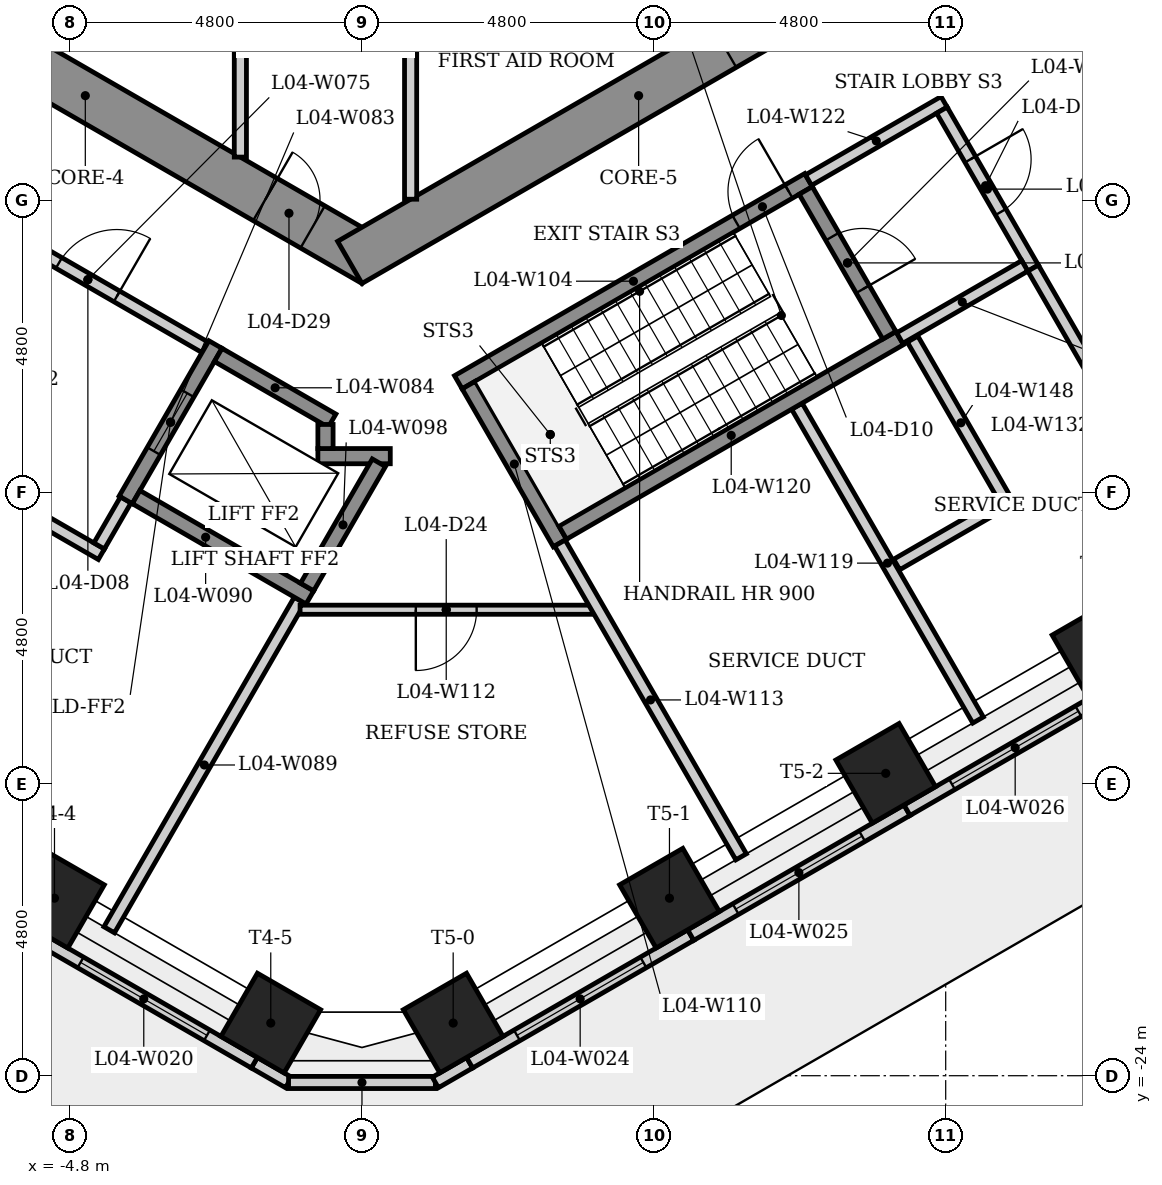
"""IFC4 building model, lengths in metres.
Left out: names, types, materials, properties, quantities, classifications, styles, units other than length and angle.
Written with IfcOpenShell. Run it as: python <this file> out.ifc"""

import sys

from ifc_helpers import new_model, si_unit, direction, frame, frame_2d, origin, origin_2d, place, context, subcontext, project, spatial, rectangle, extrude, element, fill, save


model = new_model("IFC4")
c1 = context("Model", 3, precision=1e-05, world=origin(), true_north=direction((0.0, 1.0)))
c2 = subcontext(c1, "Body", "Model", "MODEL_VIEW")
j1 = project(units=[si_unit("LENGTHUNIT", "METRE"), si_unit("PLANEANGLEUNIT", "RADIAN")], contexts=[c1])
p1 = place(None, origin())
s1 = spatial("IfcSite", under=j1, at=p1, CompositionType="ELEMENT")
p2 = place(p1, origin())
s2 = spatial("IfcBuilding", under=s1, at=p2, CompositionType="ELEMENT")
p3 = place(p2, frame((0.0, 0.0, 20.5)))
s3 = spatial("IfcBuildingStorey", under=s2, at=p3, CompositionType="ELEMENT", Elevation=20.5)
p4 = place(p3, frame((-9.3, -5.138, 0.0), z_axis=(0.0, 0.0, 1.0), x_axis=(0.866023993627, -0.500002442456, 0.0)))
e1 = element("IfcWall", 1, at=p4, inside=s3, PredefinedType="SHEAR", context=c2, shape_type="SweptSolid", body=[
    extrude(rectangle(XDim=10.97, YDim=0.8, at=frame_2d((5.485, 0.0))), origin(), (0.0, 0.0, 1.0), 5.0),
])
p5 = place(p4, frame((2.268, 0.0, 0.0)))
e2 = element("IfcOpeningElement", 2, at=p5, cuts=e1, PredefinedType="OPENING", context=c2, shape_type="SweptSolid", body=[
    extrude(rectangle(XDim=0.9, YDim=2.1, at=frame_2d((0.45, 1.05))), frame((0.0, 0.41, 0.0), z_axis=(0.0, -1.0, 0.0), x_axis=(1.0, 0.0, 0.0)), (0.0, 0.0, 1.0), 0.82),
])
p6 = place(p4, frame((8.903, 0.0, 0.0)))
e3 = element("IfcOpeningElement", 3, at=p6, cuts=e1, PredefinedType="OPENING", context=c2, shape_type="SweptSolid", body=[
    extrude(rectangle(XDim=0.9, YDim=2.1, at=frame_2d((0.45, 1.05))), frame((0.0, 0.41, 0.0), z_axis=(0.0, -1.0, 0.0), x_axis=(1.0, 0.0, 0.0)), (0.0, 0.0, 1.0), 0.82),
])
p7 = place(p3, frame((-0.2, -10.623, 0.0), z_axis=(0.0, 0.0, 1.0), x_axis=(0.866023993627, 0.500002442456, 0.0)))
e4 = element("IfcWall", 4, at=p7, inside=s3, PredefinedType="SHEAR", context=c2, shape_type="SweptSolid", body=[
    extrude(rectangle(XDim=10.97, YDim=0.8, at=frame_2d((5.485, 0.0))), origin(), (0.0, 0.0, 1.0), 5.0),
])
p8 = place(p7, frame((7.108, 0.0, 0.0)))
e5 = element("IfcOpeningElement", 5, at=p8, cuts=e4, PredefinedType="OPENING", context=c2, shape_type="SweptSolid", body=[
    extrude(rectangle(XDim=0.9, YDim=2.1, at=frame_2d((0.45, 1.05))), frame((0.0, 0.41, 0.0), z_axis=(0.0, -1.0, 0.0), x_axis=(1.0, 0.0, 0.0)), (0.0, 0.0, 1.0), 0.82),
])
for number, where, z_axis, x_axis in (
    (6, (-5.057, -21.08, 0.0), (0.0, 0.0, 1.0), (-0.5, -0.866, 0.0)),
    (7, (-1.5, -23.134, 0.0), (0.0, 0.0, 1.0), (-0.5, -0.866, 0.0)),
    (8, (1.5, -23.134, 0.0), (0.0, 0.0, 1.0), (0.5, -0.866, 0.0)),
    (9, (5.057, -21.08, 0.0), (0.0, 0.0, 1.0), (0.5, -0.866, 0.0)),
    (10, (8.614, -19.027, 0.0), (0.0, 0.0, 1.0), (0.5, -0.866, 0.0)),
    (11, (12.171, -16.973, 0.0), (0.0, 0.0, 1.0), (0.5, -0.866, 0.0)),
):
    element("IfcColumn", number, at=place(p3, frame(where, z_axis=z_axis, x_axis=x_axis)), inside=s3, PredefinedType="COLUMN", context=c2, shape_type="SweptSolid", body=[
        extrude(rectangle(XDim=1.2, YDim=1.2, at=origin_2d()), origin(), (0.0, 0.0, 1.0), 5.0),
    ])
p9 = place(p3, frame((-5.407, -21.687, 0.0), z_axis=(0.0, 0.0, 1.0), x_axis=(0.866016145416, -0.500016035621, 0.0)))
e12 = element("IfcWall", 12, at=p9, inside=s3, PredefinedType="SOLIDWALL", context=c2, shape_type="SweptSolid", body=[
    extrude(rectangle(XDim=4.199, YDim=0.2, at=frame_2d((2.1, 0.0))), origin(), (0.0, 0.0, 1.0), 4.88),
])
p10 = place(p9, frame((0.9, 0.0, 0.8)))
e13 = element("IfcOpeningElement", 13, at=p10, cuts=e12, PredefinedType="OPENING", context=c2, shape_type="SweptSolid", body=[
    extrude(rectangle(XDim=2.4, YDim=2.4, at=frame_2d((1.2, 1.2))), frame((0.0, 0.11, 0.0), z_axis=(0.0, -1.0, 0.0), x_axis=(1.0, 0.0, 0.0)), (0.0, 0.0, 1.0), 0.22),
])
p11 = place(p3, frame((-1.77, -23.786, 0.0), z_axis=(0.0, 0.0, 1.0), x_axis=(0.866085525409, -0.49989585183, 0.0)))
e14 = element("IfcWall", 14, at=p11, inside=s3, PredefinedType="SOLIDWALL", context=c2, shape_type="SweptSolid", body=[
    extrude(rectangle(XDim=0.65, YDim=0.2, at=frame_2d((0.325, 0.0))), origin(), (0.0, 0.0, 1.0), 4.88),
])
p12 = place(p3, frame((-1.207, -24.111, 0.0), z_axis=(0.0, 0.0, 1.0), x_axis=(1.0, 0.0, 0.0)))
e15 = element("IfcWall", 15, at=p12, inside=s3, PredefinedType="SOLIDWALL", context=c2, shape_type="SweptSolid", body=[
    extrude(rectangle(XDim=2.415, YDim=0.2, at=frame_2d((1.207, 0.0))), origin(), (0.0, 0.0, 1.0), 4.88),
])
p13 = place(p3, frame((1.207, -24.111, 0.0), z_axis=(0.0, 0.0, 1.0), x_axis=(0.866085525409, 0.49989585183, 0.0)))
e16 = element("IfcWall", 16, at=p13, inside=s3, PredefinedType="SOLIDWALL", context=c2, shape_type="SweptSolid", body=[
    extrude(rectangle(XDim=0.65, YDim=0.2, at=frame_2d((0.325, 0.0))), origin(), (0.0, 0.0, 1.0), 4.88),
])
p14 = place(p3, frame((1.77, -23.786, 0.0), z_axis=(0.0, 0.0, 1.0), x_axis=(0.866016145416, 0.500016035621, 0.0)))
e17 = element("IfcWall", 17, at=p14, inside=s3, PredefinedType="SOLIDWALL", context=c2, shape_type="SweptSolid", body=[
    extrude(rectangle(XDim=4.199, YDim=0.2, at=frame_2d((2.1, 0.0))), origin(), (0.0, 0.0, 1.0), 4.88),
])
p15 = place(p14, frame((0.899, 0.0, 0.8)))
e18 = element("IfcOpeningElement", 18, at=p15, cuts=e17, PredefinedType="OPENING", context=c2, shape_type="SweptSolid", body=[
    extrude(rectangle(XDim=2.4, YDim=2.4, at=frame_2d((1.2, 1.2))), frame((0.0, 0.11, 0.0), z_axis=(0.0, -1.0, 0.0), x_axis=(1.0, 0.0, 0.0)), (0.0, 0.0, 1.0), 0.22),
])
p16 = place(p3, frame((5.407, -21.687, 0.0), z_axis=(0.0, 0.0, 1.0), x_axis=(0.866029215606, 0.499993397673, 0.0)))
e19 = element("IfcWall", 19, at=p16, inside=s3, PredefinedType="SOLIDWALL", context=c2, shape_type="SweptSolid", body=[
    extrude(rectangle(XDim=4.108, YDim=0.2, at=frame_2d((2.054, 0.0))), origin(), (0.0, 0.0, 1.0), 4.88),
])
p17 = place(p16, frame((0.854, 0.0, 0.8)))
e20 = element("IfcOpeningElement", 20, at=p17, cuts=e19, PredefinedType="OPENING", context=c2, shape_type="SweptSolid", body=[
    extrude(rectangle(XDim=2.4, YDim=2.4, at=frame_2d((1.2, 1.2))), frame((0.0, 0.11, 0.0), z_axis=(0.0, -1.0, 0.0), x_axis=(1.0, 0.0, 0.0)), (0.0, 0.0, 1.0), 0.22),
])
p18 = place(p3, frame((8.964, -19.633, 0.0), z_axis=(0.0, 0.0, 1.0), x_axis=(0.866021252249, 0.500007190601, 0.0)))
e21 = element("IfcWall", 21, at=p18, inside=s3, PredefinedType="SOLIDWALL", context=c2, shape_type="SweptSolid", body=[
    extrude(rectangle(XDim=4.107, YDim=0.2, at=frame_2d((2.053, 0.0))), origin(), (0.0, 0.0, 1.0), 4.88),
])
p19 = place(p18, frame((0.854, 0.0, 0.8)))
e22 = element("IfcOpeningElement", 22, at=p19, cuts=e21, PredefinedType="OPENING", context=c2, shape_type="SweptSolid", body=[
    extrude(rectangle(XDim=2.4, YDim=2.4, at=frame_2d((1.2, 1.2))), frame((0.0, 0.11, 0.0), z_axis=(0.0, -1.0, 0.0), x_axis=(1.0, 0.0, 0.0)), (0.0, 0.0, 1.0), 0.22),
])
p20 = place(p3, frame((-8.356, -13.073, 0.0), z_axis=(0.0, 0.0, 1.0), x_axis=(0.866038532462, -0.499977259774, 0.0)))
e23 = element("IfcWall", 23, at=p20, inside=s3, PredefinedType="PLUMBINGWALL", context=c2, shape_type="SweptSolid", body=[
    extrude(rectangle(XDim=4.7, YDim=0.2, at=frame_2d((2.35, 0.0))), origin(), (0.0, 0.0, 1.0), 4.65),
])
p21 = place(p3, frame((-6.435, -9.795, 0.0), z_axis=(0.0, 0.0, 1.0), x_axis=(0.866012907634, -0.500021643343, 0.0)))
e24 = element("IfcWall", 24, at=p21, inside=s3, PredefinedType="PARTITIONING", context=c2, shape_type="SweptSolid", body=[
    extrude(rectangle(XDim=4.45, YDim=0.2, at=frame_2d((2.225, 0.0))), origin(), (0.0, 0.0, 1.0), 4.65),
])
p22 = place(p21, frame((1.675, 0.0, 0.0)))
e25 = element("IfcOpeningElement", 25, at=p22, cuts=e24, PredefinedType="OPENING", context=c2, shape_type="SweptSolid", body=[
    extrude(rectangle(XDim=1.1, YDim=2.1, at=frame_2d((0.55, 1.05))), frame((0.0, 0.11, 0.0), z_axis=(0.0, -1.0, 0.0), x_axis=(1.0, 0.0, 0.0)), (0.0, 0.0, 1.0), 0.22),
])
p23 = place(p3, frame((-3.885, -14.529, 0.0), z_axis=(0.0, 0.0, 1.0), x_axis=(-0.499859285417, -0.866106630146, 0.0)))
e26 = element("IfcWall", 26, at=p23, inside=s3, PredefinedType="PLUMBINGWALL", context=c2, shape_type="SweptSolid", body=[
    extrude(rectangle(XDim=0.875, YDim=0.2, at=frame_2d((0.438, 0.0))), origin(), (0.0, 0.0, 1.0), 4.65),
])
p24 = place(p3, frame((-2.41, -11.974, 0.0), z_axis=(0.0, 0.0, 1.0), x_axis=(-0.500001826776, -0.866024349092, 0.0)))
e27 = element("IfcWall", 27, at=p24, inside=s3, PredefinedType="SHEAR", context=c2, shape_type="SweptSolid", body=[
    extrude(rectangle(XDim=2.95, YDim=0.25, at=frame_2d((1.475, 0.0))), origin(), (0.0, 0.0, 1.0), 4.65),
])
p25 = place(p24, frame((0.925, 0.0, 0.0)))
e28 = element("IfcOpeningElement", 28, at=p25, cuts=e27, PredefinedType="OPENING", context=c2, shape_type="SweptSolid", body=[
    extrude(rectangle(XDim=1.1, YDim=2.1, at=frame_2d((0.55, 1.05))), frame((0.0, 0.135, 0.0), z_axis=(0.0, -1.0, 0.0), x_axis=(1.0, 0.0, 0.0)), (0.0, 0.0, 1.0), 0.27),
])
p26 = place(p3, frame((-2.364, -12.145, 0.0), z_axis=(0.0, 0.0, 1.0), x_axis=(0.86603892542, -0.499976579108, 0.0)))
e29 = element("IfcWall", 29, at=p26, inside=s3, PredefinedType="SHEAR", context=c2, shape_type="SweptSolid", body=[
    extrude(rectangle(XDim=2.162, YDim=0.25, at=frame_2d((1.081, 0.0))), origin(), (0.0, 0.0, 1.0), 4.65),
])
p27 = place(p3, frame((-2.0, -5.275, 0.0), z_axis=(0.0, 0.0, 1.0), x_axis=(0.0, -1.0, 0.0)))
e30 = element("IfcWall", 30, at=p27, inside=s3, PredefinedType="PARTITIONING", context=c2, shape_type="SweptSolid", body=[
    extrude(rectangle(XDim=3.616, YDim=0.2, at=frame_2d((1.808, 0.0))), origin(), (0.0, 0.0, 1.0), 4.65),
])
p28 = place(p3, frame((-4.157, -21.6, 0.0), z_axis=(0.0, 0.0, 1.0), x_axis=(0.499998165157, 0.866026463129, 0.0)))
e31 = element("IfcWall", 31, at=p28, inside=s3, PredefinedType="PLUMBINGWALL", context=c2, shape_type="SweptSolid", body=[
    extrude(rectangle(XDim=6.26, YDim=0.2, at=frame_2d((3.13, 0.0))), origin(), (0.0, 0.0, 1.0), 4.65),
])
p29 = place(p3, frame((-0.856, -16.133, 0.0), z_axis=(0.0, 0.0, 1.0), x_axis=(-0.866021716278, 0.500006386895, 0.0)))
e32 = element("IfcWall", 32, at=p29, inside=s3, PredefinedType="SHEAR", context=c2, shape_type="SweptSolid", body=[
    extrude(rectangle(XDim=3.3, YDim=0.25, at=frame_2d((1.65, 0.0))), origin(), (0.0, 0.0, 1.0), 4.65),
])
p30 = place(p3, frame((-0.725, -13.81, 0.0), z_axis=(0.0, 0.0, 1.0), x_axis=(1.0, 0.0, 0.0)))
e33 = element("IfcWall", 33, at=p30, inside=s3, PredefinedType="SHEAR", context=c2, shape_type="SweptSolid", body=[
    extrude(rectangle(XDim=1.191, YDim=0.25, at=frame_2d((0.595, 0.0))), origin(), (0.0, 0.0, 1.0), 4.65),
])
p31 = place(p3, frame((-0.6, -13.289, 0.0), z_axis=(0.0, 0.0, 1.0), x_axis=(0.0, -1.0, 0.0)))
e34 = element("IfcWall", 34, at=p31, inside=s3, PredefinedType="SHEAR", context=c2, shape_type="SweptSolid", body=[
    extrude(rectangle(XDim=0.396, YDim=0.25, at=frame_2d((0.198, 0.0))), origin(), (0.0, 0.0, 1.0), 5.0),
])
p32 = place(p3, frame((0.278, -13.918, 0.0), z_axis=(0.0, 0.0, 1.0), x_axis=(-0.49998806882, -0.866032292145, 0.0)))
e35 = element("IfcWall", 35, at=p32, inside=s3, PredefinedType="SHEAR", context=c2, shape_type="SweptSolid", body=[
    extrude(rectangle(XDim=2.36, YDim=0.25, at=frame_2d((1.18, 0.0))), origin(), (0.0, 0.0, 1.0), 5.0),
])
p33 = place(p3, frame((0.8, -5.275, 0.0), z_axis=(0.0, 0.0, 1.0), x_axis=(0.0, -1.0, 0.0)))
e36 = element("IfcWall", 36, at=p33, inside=s3, PredefinedType="PARTITIONING", context=c2, shape_type="SweptSolid", body=[
    extrude(rectangle(XDim=4.309, YDim=0.2, at=frame_2d((2.155, 0.0))), origin(), (0.0, 0.0, 1.0), 4.65),
])
p34 = place(p3, frame((1.585, -12.595, 0.0), z_axis=(0.0, 0.0, 1.0), x_axis=(0.866036417653, 0.499980922934, 0.0)))
e37 = element("IfcWall", 37, at=p34, inside=s3, PredefinedType="SHEAR", context=c2, shape_type="SweptSolid", body=[
    extrude(rectangle(XDim=6.65, YDim=0.25, at=frame_2d((3.325, 0.0))), origin(), (0.0, 0.0, 1.0), 4.65),
])
p35 = place(p34, frame((5.275, 0.0, 0.0)))
e38 = element("IfcOpeningElement", 38, at=p35, cuts=e37, PredefinedType="OPENING", context=c2, shape_type="SweptSolid", body=[
    extrude(rectangle(XDim=1.0, YDim=2.1, at=frame_2d((0.5, 1.05))), frame((0.0, 0.135, 0.0), z_axis=(0.0, -1.0, 0.0), x_axis=(1.0, 0.0, 0.0)), (0.0, 0.0, 1.0), 0.27),
])
p36 = place(p3, frame((3.256, -15.239, 0.0), z_axis=(0.0, 0.0, 1.0), x_axis=(-0.50002537861, 0.866010750942, 0.0)))
e39 = element("IfcWall", 39, at=p36, inside=s3, PredefinedType="SHEAR", context=c2, shape_type="SweptSolid", body=[
    extrude(rectangle(XDim=3.0, YDim=0.25, at=frame_2d((1.5, 0.0))), origin(), (0.0, 0.0, 1.0), 4.65),
])
p37 = place(p3, frame((3.789, -16.336, 0.0), z_axis=(0.0, 0.0, 1.0), x_axis=(-1.0, 0.0, 0.0)))
e40 = element("IfcWall", 40, at=p37, inside=s3, PredefinedType="PARTITIONING", context=c2, shape_type="SweptSolid", body=[
    extrude(rectangle(XDim=4.807, YDim=0.15, at=frame_2d((2.403, 0.0))), origin(), (0.0, 0.0, 1.0), 4.65),
])
p38 = place(p37, frame((1.903, 0.0, 0.0)))
e41 = element("IfcOpeningElement", 41, at=p38, cuts=e40, PredefinedType="OPENING", context=c2, shape_type="SweptSolid", body=[
    extrude(rectangle(XDim=1.0, YDim=2.1, at=frame_2d((0.5, 1.05))), frame((0.0, 0.085, 0.0), z_axis=(0.0, -1.0, 0.0), x_axis=(1.0, 0.0, 0.0)), (0.0, 0.0, 1.0), 0.17),
])
p39 = place(p3, frame((3.256, -15.239, 0.0), z_axis=(0.0, 0.0, 1.0), x_axis=(0.499994325412, -0.866028679985, 0.0)))
e42 = element("IfcWall", 42, at=p39, inside=s3, PredefinedType="PLUMBINGWALL", context=c2, shape_type="SweptSolid", body=[
    extrude(rectangle(XDim=5.959, YDim=0.2, at=frame_2d((2.98, 0.0))), origin(), (0.0, 0.0, 1.0), 4.65),
])
p40 = place(p3, frame((7.153, -12.989, 0.0), z_axis=(0.0, 0.0, 1.0), x_axis=(0.500025049464, -0.866010940986, 0.0)))
e43 = element("IfcWall", 43, at=p40, inside=s3, PredefinedType="PLUMBINGWALL", context=c2, shape_type="SweptSolid", body=[
    extrude(rectangle(XDim=5.96, YDim=0.2, at=frame_2d((2.98, 0.0))), origin(), (0.0, 0.0, 1.0), 4.65),
])
p41 = place(p3, frame((3.301, -15.068, 0.0), z_axis=(0.0, 0.0, 1.0), x_axis=(0.866035036182, 0.499983315828, 0.0)))
e44 = element("IfcWall", 44, at=p41, inside=s3, PredefinedType="SHEAR", context=c2, shape_type="SweptSolid", body=[
    extrude(rectangle(XDim=6.4, YDim=0.25, at=frame_2d((3.2, 0.0))), origin(), (0.0, 0.0, 1.0), 4.65),
])
p42 = place(p3, frame((7.298, -9.441, 0.0), z_axis=(0.0, 0.0, 1.0), x_axis=(0.500034990121, -0.866005201286, 0.0)))
e45 = element("IfcWall", 45, at=p42, inside=s3, PredefinedType="SHEAR", context=c2, shape_type="SweptSolid", body=[
    extrude(rectangle(XDim=2.75, YDim=0.25, at=frame_2d((1.375, 0.0))), origin(), (0.0, 0.0, 1.0), 4.65),
])
p43 = place(p42, frame((0.875, 0.0, 0.0)))
e46 = element("IfcOpeningElement", 46, at=p43, cuts=e45, PredefinedType="OPENING", context=c2, shape_type="SweptSolid", body=[
    extrude(rectangle(XDim=1.0, YDim=2.1, at=frame_2d((0.5, 1.05))), frame((0.0, 0.135, 0.0), z_axis=(0.0, -1.0, 0.0), x_axis=(1.0, 0.0, 0.0)), (0.0, 0.0, 1.0), 0.27),
])
p44 = place(p3, frame((7.344, -9.27, 0.0), z_axis=(0.0, 0.0, 1.0), x_axis=(0.866005588531, 0.500034319456, 0.0)))
e47 = element("IfcWall", 47, at=p44, inside=s3, PredefinedType="PARTITIONING", context=c2, shape_type="SweptSolid", body=[
    extrude(rectangle(XDim=2.575, YDim=0.2, at=frame_2d((1.288, 0.0))), origin(), (0.0, 0.0, 1.0), 4.65),
])
p45 = place(p3, frame((9.537, -8.119, 0.0), z_axis=(0.0, 0.0, 1.0), x_axis=(0.499990139034, -0.866031096941, 0.0)))
e48 = element("IfcWall", 48, at=p45, inside=s3, PredefinedType="PARTITIONING", context=c2, shape_type="SweptSolid", body=[
    extrude(rectangle(XDim=3.0, YDim=0.2, at=frame_2d((1.5, 0.0))), origin(), (0.0, 0.0, 1.0), 4.65),
])
p46 = place(p45, frame((0.935, 0.0, 0.0)))
e49 = element("IfcOpeningElement", 49, at=p46, cuts=e48, PredefinedType="OPENING", context=c2, shape_type="SweptSolid", body=[
    extrude(rectangle(XDim=1.0, YDim=2.1, at=frame_2d((0.5, 1.05))), frame((0.0, 0.11, 0.0), z_axis=(0.0, -1.0, 0.0), x_axis=(1.0, 0.0, 0.0)), (0.0, 0.0, 1.0), 0.22),
])
p47 = place(p3, frame((10.901, -10.681, 0.0), z_axis=(0.0, 0.0, 1.0), x_axis=(-0.866007538022, -0.500030943131, 0.0)))
e50 = element("IfcWall", 50, at=p47, inside=s3, PredefinedType="PLUMBINGWALL", context=c2, shape_type="SweptSolid", body=[
    extrude(rectangle(XDim=2.375, YDim=0.2, at=frame_2d((1.188, 0.0))), origin(), (0.0, 0.0, 1.0), 4.65),
])
p48 = place(p3, frame((11.037, -10.717, 0.0), z_axis=(0.0, 0.0, 1.0), x_axis=(0.500000259638, -0.866025253883, 0.0)))
e51 = element("IfcWall", 51, at=p48, inside=s3, PredefinedType="PLUMBINGWALL", context=c2, shape_type="SweptSolid", body=[
    extrude(rectangle(XDim=5.984, YDim=0.2, at=frame_2d((2.992, 0.0))), origin(), (0.0, 0.0, 1.0), 4.65),
])
p49 = place(p3, frame((9.055, -11.885, 0.0), z_axis=(0.0, 0.0, 1.0), x_axis=(0.50002815445, -0.866009148195, 0.0)))
e52 = element("IfcWall", 52, at=p49, inside=s3, PredefinedType="PLUMBINGWALL", context=c2, shape_type="SweptSolid", body=[
    extrude(rectangle(XDim=3.18, YDim=0.2, at=frame_2d((1.59, 0.0))), origin(), (0.0, 0.0, 1.0), 4.65),
])
p50 = place(p3, frame((10.509, -14.602, 0.0), z_axis=(0.0, 0.0, 1.0), x_axis=(-0.866011036969, -0.500024883228, 0.0)))
e53 = element("IfcWall", 53, at=p50, inside=s3, PredefinedType="PLUMBINGWALL", context=c2, shape_type="SweptSolid", body=[
    extrude(rectangle(XDim=1.98, YDim=0.2, at=frame_2d((0.99, 0.0))), origin(), (0.0, 0.0, 1.0), 4.65),
])
p51 = place(p10, origin())
e54 = element("IfcWindow", 54, at=p51, inside=s3, PartitioningType="SINGLE_PANEL", PredefinedType="WINDOW", context=c2, shape_type="SweptSolid", body=[
    extrude(rectangle(XDim=2.4, YDim=2.4, at=frame_2d((1.2, 1.2))), frame((0.0, 0.03, 0.0), z_axis=(0.0, -1.0, 0.0), x_axis=(1.0, 0.0, 0.0)), (0.0, 0.0, 1.0), 0.06),
])
fill(e13, e54)
p52 = place(p15, origin())
e55 = element("IfcWindow", 55, at=p52, inside=s3, PartitioningType="SINGLE_PANEL", PredefinedType="WINDOW", context=c2, shape_type="SweptSolid", body=[
    extrude(rectangle(XDim=2.4, YDim=2.4, at=frame_2d((1.2, 1.2))), frame((0.0, 0.03, 0.0), z_axis=(0.0, -1.0, 0.0), x_axis=(1.0, 0.0, 0.0)), (0.0, 0.0, 1.0), 0.06),
])
fill(e18, e55)
p53 = place(p17, origin())
e56 = element("IfcWindow", 56, at=p53, inside=s3, PartitioningType="SINGLE_PANEL", PredefinedType="WINDOW", context=c2, shape_type="SweptSolid", body=[
    extrude(rectangle(XDim=2.4, YDim=2.4, at=frame_2d((1.2, 1.2))), frame((0.0, 0.03, 0.0), z_axis=(0.0, -1.0, 0.0), x_axis=(1.0, 0.0, 0.0)), (0.0, 0.0, 1.0), 0.06),
])
fill(e20, e56)
p54 = place(p19, origin())
e57 = element("IfcWindow", 57, at=p54, inside=s3, PartitioningType="SINGLE_PANEL", PredefinedType="WINDOW", context=c2, shape_type="SweptSolid", body=[
    extrude(rectangle(XDim=2.4, YDim=2.4, at=frame_2d((1.2, 1.2))), frame((0.0, 0.03, 0.0), z_axis=(0.0, -1.0, 0.0), x_axis=(1.0, 0.0, 0.0)), (0.0, 0.0, 1.0), 0.06),
])
fill(e22, e57)
p55 = place(p22, origin())
e58 = element("IfcDoor", 58, at=p55, inside=s3, OperationType="SINGLE_SWING_RIGHT", PredefinedType="DOOR", context=c2, shape_type="SweptSolid", body=[
    extrude(rectangle(XDim=1.1, YDim=2.1, at=frame_2d((0.55, 1.05))), frame((0.0, 0.025, 0.0), z_axis=(0.0, -1.0, 0.0), x_axis=(1.0, 0.0, 0.0)), (0.0, 0.0, 1.0), 0.05),
])
fill(e25, e58)
p56 = place(p25, origin())
e59 = element("IfcDoor", 59, at=p56, inside=s3, OperationType="SLIDING_TO_LEFT", PredefinedType="DOOR", context=c2, shape_type="SweptSolid", body=[
    extrude(rectangle(XDim=1.1, YDim=2.1, at=frame_2d((0.55, 1.05))), frame((0.0, 0.025, 0.0), z_axis=(0.0, -1.0, 0.0), x_axis=(1.0, 0.0, 0.0)), (0.0, 0.0, 1.0), 0.05),
])
fill(e28, e59)
p57 = place(p35, origin())
e60 = element("IfcDoor", 60, at=p57, inside=s3, OperationType="SINGLE_SWING_RIGHT", PredefinedType="DOOR", context=c2, shape_type="SweptSolid", body=[
    extrude(rectangle(XDim=1.0, YDim=2.1, at=frame_2d((0.5, 1.05))), frame((0.0, 0.025, 0.0), z_axis=(0.0, -1.0, 0.0), x_axis=(1.0, 0.0, 0.0)), (0.0, 0.0, 1.0), 0.05),
])
fill(e38, e60)
p58 = place(p46, origin())
e61 = element("IfcDoor", 61, at=p58, inside=s3, OperationType="SINGLE_SWING_LEFT", PredefinedType="DOOR", context=c2, shape_type="SweptSolid", body=[
    extrude(rectangle(XDim=1.0, YDim=2.1, at=frame_2d((0.5, 1.05))), frame((0.0, 0.025, 0.0), z_axis=(0.0, -1.0, 0.0), x_axis=(1.0, 0.0, 0.0)), (0.0, 0.0, 1.0), 0.05),
])
fill(e49, e61)
p59 = place(p43, origin())
e62 = element("IfcDoor", 62, at=p59, inside=s3, OperationType="SINGLE_SWING_RIGHT", PredefinedType="DOOR", context=c2, shape_type="SweptSolid", body=[
    extrude(rectangle(XDim=1.0, YDim=2.1, at=frame_2d((0.5, 1.05))), frame((0.0, 0.025, 0.0), z_axis=(0.0, -1.0, 0.0), x_axis=(1.0, 0.0, 0.0)), (0.0, 0.0, 1.0), 0.05),
])
fill(e46, e62)
p60 = place(p38, origin())
e63 = element("IfcDoor", 63, at=p60, inside=s3, OperationType="SINGLE_SWING_RIGHT", PredefinedType="DOOR", context=c2, shape_type="SweptSolid", body=[
    extrude(rectangle(XDim=1.0, YDim=2.1, at=frame_2d((0.5, 1.05))), frame((0.0, 0.025, 0.0), z_axis=(0.0, -1.0, 0.0), x_axis=(1.0, 0.0, 0.0)), (0.0, 0.0, 1.0), 0.05),
])
fill(e41, e63)
p61 = place(p6, origin())
e64 = element("IfcDoor", 64, at=p61, inside=s3, OperationType="SINGLE_SWING_LEFT", PredefinedType="DOOR", context=c2, shape_type="SweptSolid", body=[
    extrude(rectangle(XDim=0.9, YDim=2.1, at=frame_2d((0.45, 1.05))), frame((0.0, 0.025, 0.0), z_axis=(0.0, -1.0, 0.0), x_axis=(1.0, 0.0, 0.0)), (0.0, 0.0, 1.0), 0.05),
])
fill(e3, e64)
save(model, sys.argv[1])
